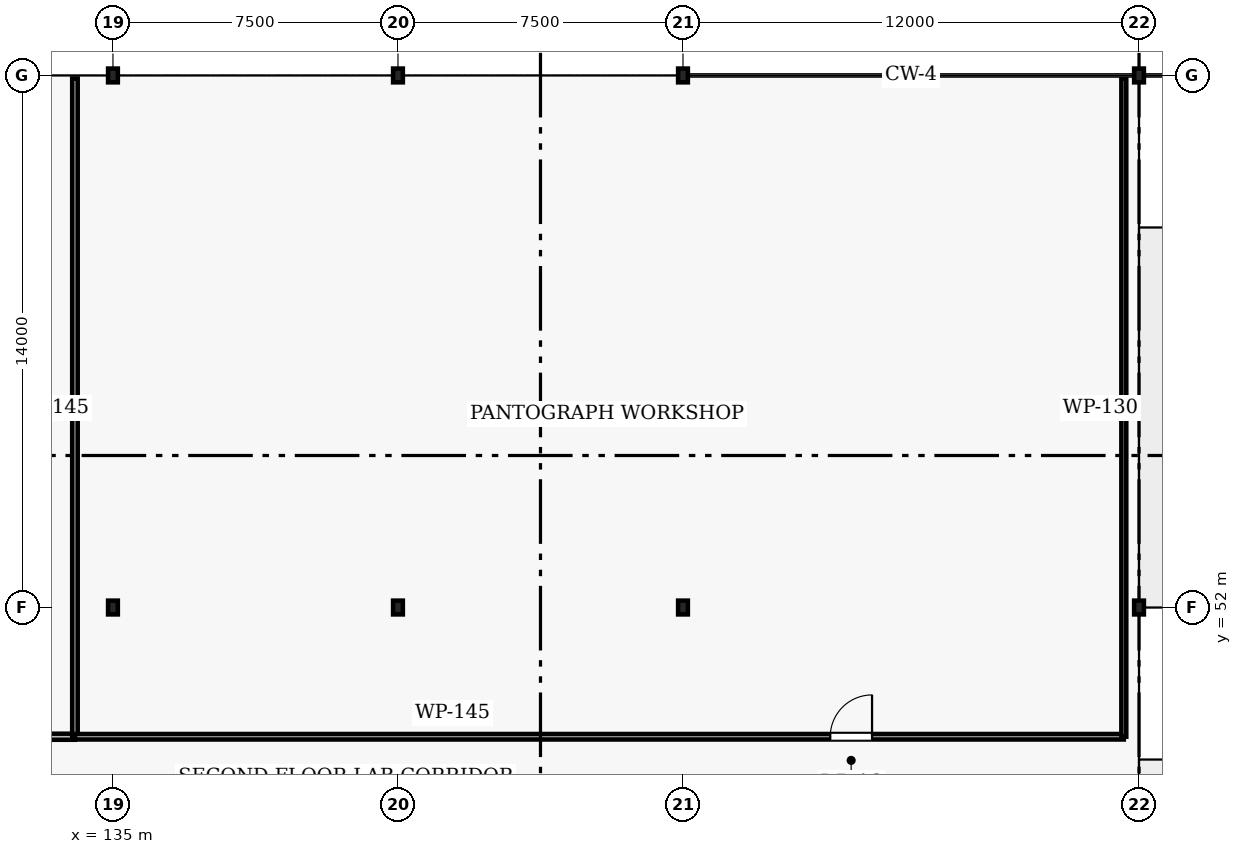
"""IFC4 building model, lengths in metres.
Left out: names, types, materials, properties, quantities, classifications, styles, units other than length and angle.
Written with IfcOpenShell. Run it as: python <this file> out.ifc"""

import sys

from ifc_helpers import new_model, si_unit, direction, frame, frame_2d, origin, origin_2d, place, context, subcontext, project, spatial, rectangle, i_section, extrude, element, fill, save


model = new_model("IFC4")
c1 = context("Model", 3, precision=1e-05, world=origin(), true_north=direction((0.0, 1.0)))
c2 = subcontext(c1, "Body", "Model", "MODEL_VIEW")
j1 = project(units=[si_unit("LENGTHUNIT", "METRE"), si_unit("PLANEANGLEUNIT", "RADIAN")], contexts=[c1])
p1 = place(None, origin())
s1 = spatial("IfcSite", under=j1, at=p1, CompositionType="ELEMENT")
p2 = place(p1, origin())
s2 = spatial("IfcBuilding", under=s1, at=p2, CompositionType="ELEMENT")
p3 = place(p2, frame((0.0, 0.0, 9.0)))
s3 = spatial("IfcBuildingStorey", under=s2, at=p3, CompositionType="ELEMENT", Elevation=9.0)
for number, where, z_axis, x_axis in (
    (1, (135.0, 52.0, 0.0), (0.0, 0.0, 1.0), (1.0, 0.0, 0.0)),
    (2, (135.0, 66.0, 0.0), (0.0, 0.0, 1.0), (1.0, 0.0, 0.0)),
    (3, (142.5, 52.0, 0.0), (0.0, 0.0, 1.0), (1.0, 0.0, 0.0)),
    (4, (142.5, 66.0, 0.0), (0.0, 0.0, 1.0), (1.0, 0.0, 0.0)),
    (5, (150.0, 52.0, 0.0), (0.0, 0.0, 1.0), (1.0, 0.0, 0.0)),
    (6, (150.0, 66.0, 0.0), (0.0, 0.0, 1.0), (1.0, 0.0, 0.0)),
    (7, (162.0, 52.0, 0.0), (0.0, 0.0, 1.0), (1.0, 0.0, 0.0)),
    (8, (162.0, 66.0, 0.0), (0.0, 0.0, 1.0), (1.0, 0.0, 0.0)),
):
    element("IfcColumn", number, at=place(p3, frame(where, z_axis=z_axis, x_axis=x_axis)), inside=s3, PredefinedType="COLUMN", context=c2, shape_type="SweptSolid", body=[
        extrude(i_section(OverallWidth=0.257, OverallDepth=0.363, WebThickness=0.013, FlangeThickness=0.022, FilletRadius=0.015, at=origin_2d()), origin(), (0.0, 0.0, 1.0), 4.5),
    ])
p4 = place(p3, frame((105.16, 48.6, 0.0), z_axis=(0.0, 0.0, 1.0), x_axis=(1.0, 0.0, 0.0)))
e9 = element("IfcWall", 9, at=p4, inside=s3, PredefinedType="PARTITIONING", context=c2, shape_type="SweptSolid", body=[
    extrude(rectangle(XDim=28.84, YDim=0.16, at=frame_2d((14.42, 0.0))), origin(), (0.0, 0.0, 1.0), 3.7),
])
p5 = place(p4, frame((10.549, 0.0, 0.0)))
e10 = element("IfcOpeningElement", 10, at=p5, cuts=e9, PredefinedType="OPENING", context=c2, shape_type="SweptSolid", body=[
    extrude(rectangle(XDim=1.08, YDim=2.16, at=frame_2d((0.54, 1.08))), frame((0.0, 0.09, 0.0), z_axis=(0.0, -1.0, 0.0), x_axis=(1.0, 0.0, 0.0)), (0.0, 0.0, 1.0), 0.18),
])
p6 = place(p3, frame((134.0, 48.6, 0.0), z_axis=(0.0, 0.0, 1.0), x_axis=(0.0, 1.0, 0.0)))
e11 = element("IfcWall", 11, at=p6, inside=s3, PredefinedType="PARTITIONING", context=c2, shape_type="SweptSolid", body=[
    extrude(rectangle(XDim=17.32, YDim=0.145, at=frame_2d((8.66, 0.0))), origin(), (0.0, 0.0, 1.0), 3.7),
])
p7 = place(p3, frame((134.0, 48.6, 0.0), z_axis=(0.0, 0.0, 1.0), x_axis=(1.0, 0.0, 0.0)))
e12 = element("IfcWall", 12, at=p7, inside=s3, PredefinedType="PARTITIONING", context=c2, shape_type="SweptSolid", body=[
    extrude(rectangle(XDim=27.6, YDim=0.145, at=frame_2d((13.8, 0.0))), origin(), (0.0, 0.0, 1.0), 3.7),
])
p8 = place(p7, frame((19.875, 0.0, 0.0)))
e13 = element("IfcOpeningElement", 13, at=p8, cuts=e12, PredefinedType="OPENING", context=c2, shape_type="SweptSolid", body=[
    extrude(rectangle(XDim=1.1, YDim=2.08, at=frame_2d((0.55, 1.04))), frame((0.0, 0.083, 0.0), z_axis=(0.0, -1.0, 0.0), x_axis=(1.0, 0.0, 0.0)), (0.0, 0.0, 1.0), 0.165),
])
p9 = place(p3, frame((161.6, 48.6, 0.0), z_axis=(0.0, 0.0, 1.0), x_axis=(0.0, 1.0, 0.0)))
e14 = element("IfcWall", 14, at=p9, inside=s3, PredefinedType="PARTITIONING", context=c2, shape_type="SweptSolid", body=[
    extrude(rectangle(XDim=17.32, YDim=0.13, at=frame_2d((8.66, 0.0))), origin(), (0.0, 0.0, 1.0), 3.633),
])
p10 = place(p8, origin())
e15 = element("IfcDoor", 15, at=p10, inside=s3, OperationType="SINGLE_SWING_RIGHT", PredefinedType="DOOR", context=c2, shape_type="SweptSolid", body=[
    extrude(rectangle(XDim=1.1, YDim=2.08, at=frame_2d((0.55, 1.04))), frame((0.0, 0.025, 0.0), z_axis=(0.0, -1.0, 0.0), x_axis=(1.0, 0.0, 0.0)), (0.0, 0.0, 1.0), 0.05),
])
fill(e13, e15)
save(model, sys.argv[1])
